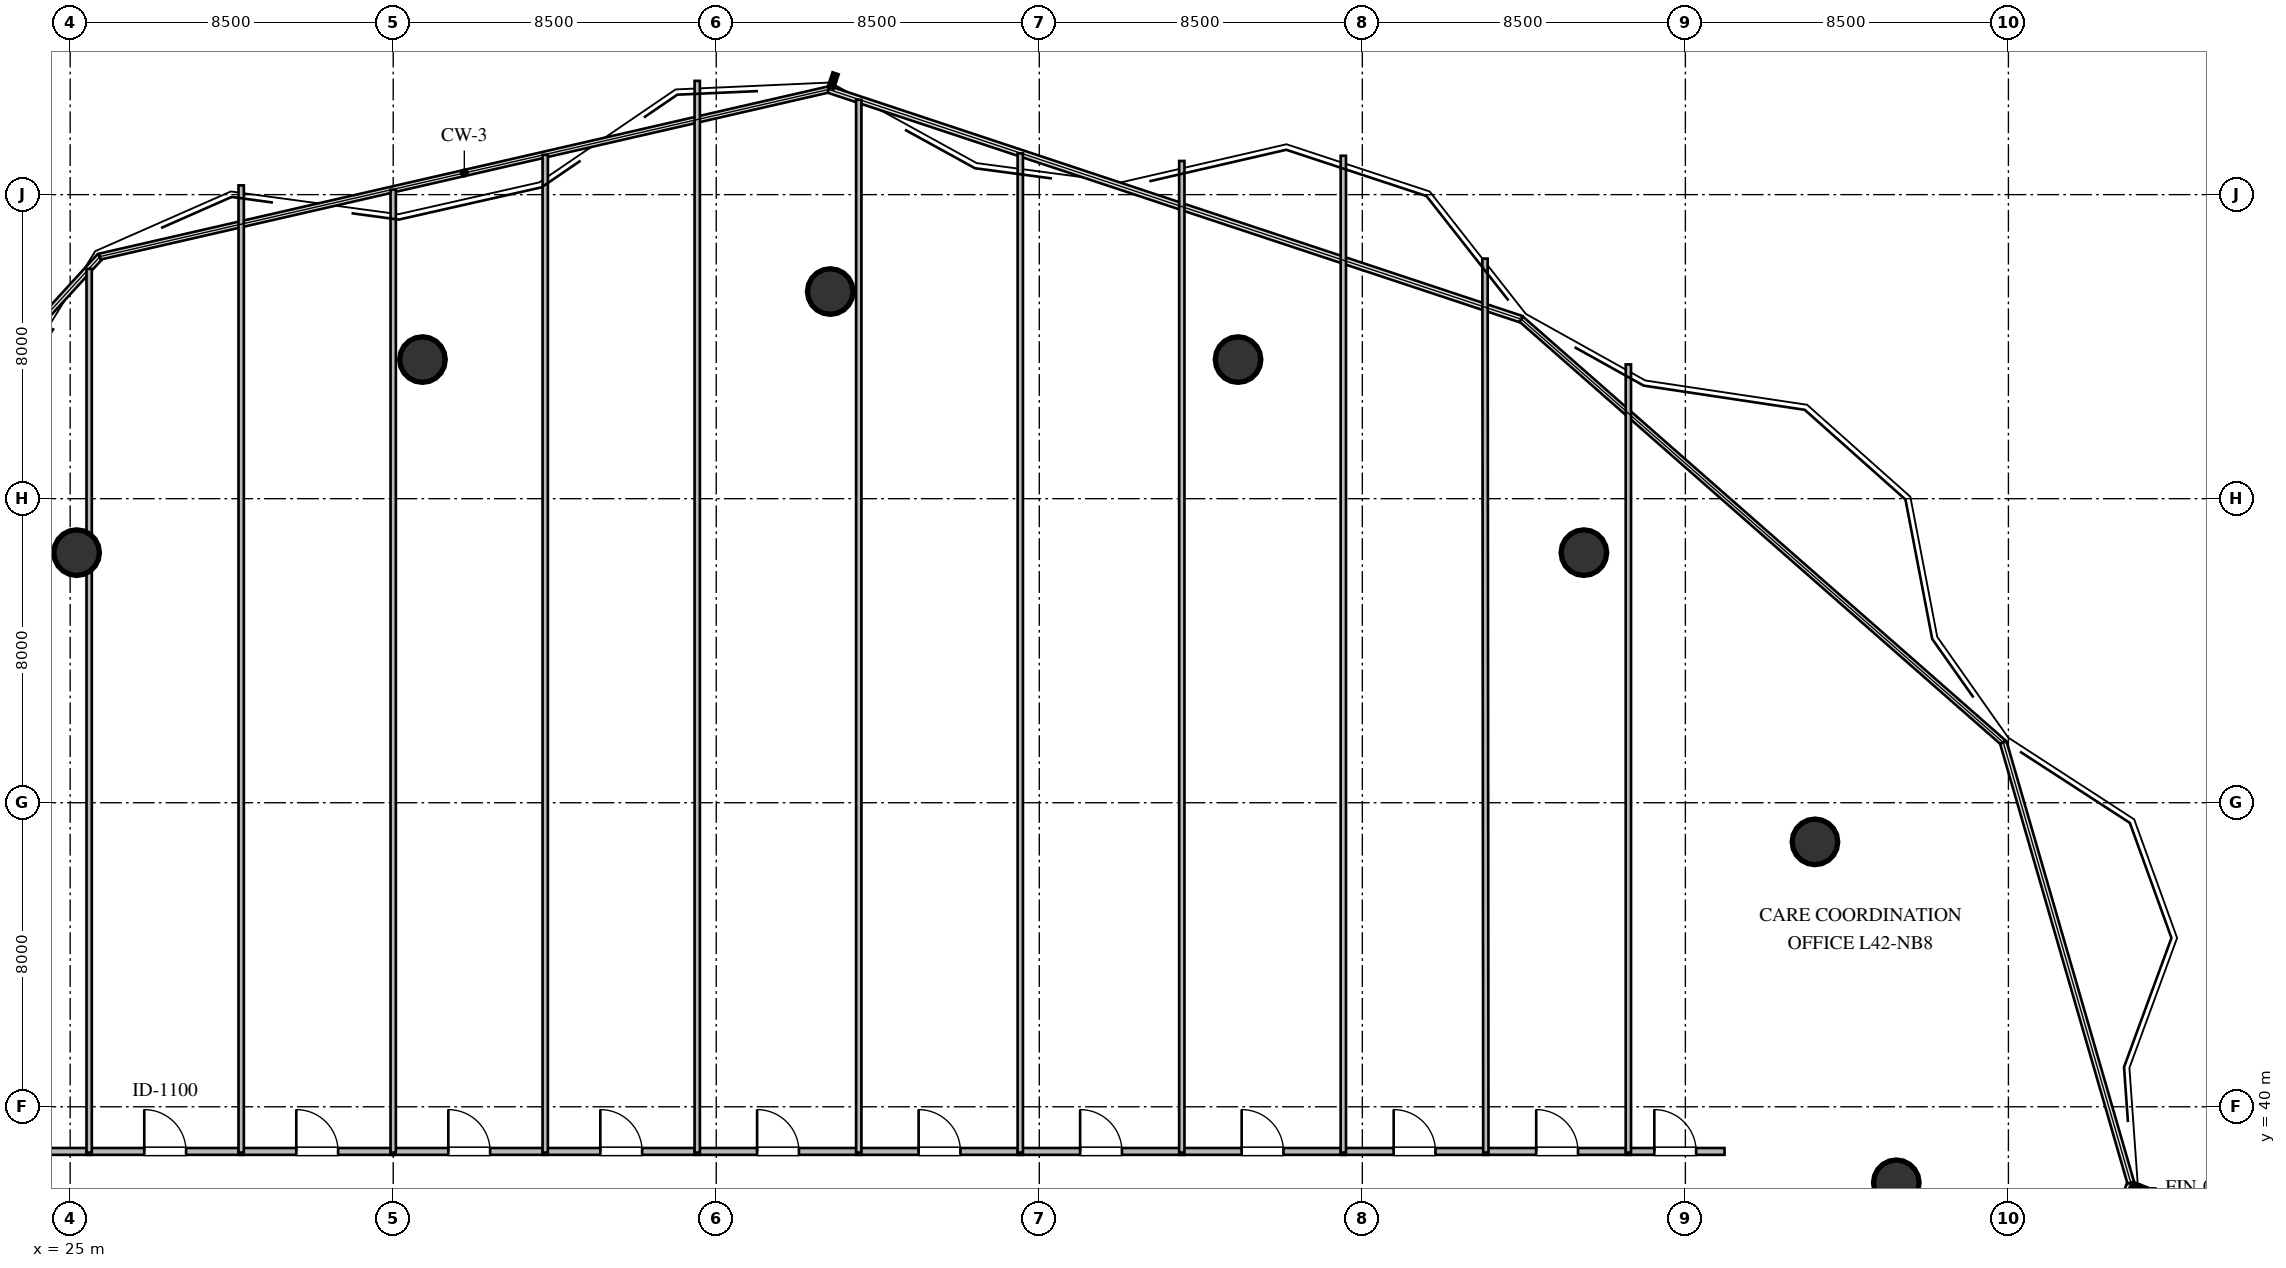
"""IFC4 building model, lengths in metres.
Left out: names, types, materials, properties, quantities, classifications, styles, units other than length and angle.
Written with IfcOpenShell. Run it as: python <this file> out.ifc"""

import sys

from ifc_helpers import new_model, si_unit, direction, frame, frame_2d, origin, origin_2d, place, context, subcontext, project, spatial, rectangle, circle, extrude, element, fill, save


model = new_model("IFC4")
c1 = context("Model", 3, precision=1e-05, world=origin(), true_north=direction((0.0, 1.0)))
c2 = subcontext(c1, "Body", "Model", "MODEL_VIEW")
j1 = project(units=[si_unit("LENGTHUNIT", "METRE"), si_unit("PLANEANGLEUNIT", "RADIAN")], contexts=[c1])
p1 = place(None, origin())
s1 = spatial("IfcSite", under=j1, at=p1, CompositionType="ELEMENT")
p2 = place(p1, origin())
s2 = spatial("IfcBuilding", under=s1, at=p2, CompositionType="ELEMENT")
p3 = place(p2, frame((0.0, 0.0, 160.2)))
s3 = spatial("IfcBuildingStorey", under=s2, at=p3, CompositionType="ELEMENT", Elevation=160.2)
for number, where, z_axis, x_axis in (
    (1, (73.05, 38.0, 0.0), (0.0, 0.0, 1.0), (1.0, 0.0, 0.0)),
    (2, (70.91, 46.97, 0.0), (0.0, 0.0, 1.0), (1.0, 0.0, 0.0)),
    (3, (64.83, 54.58, 0.0), (0.0, 0.0, 1.0), (1.0, 0.0, 0.0)),
    (4, (55.73, 59.66, 0.0), (0.0, 0.0, 1.0), (1.0, 0.0, 0.0)),
    (5, (45.0, 61.45, 0.0), (0.0, 0.0, 1.0), (1.0, 0.0, 0.0)),
    (6, (34.27, 59.66, 0.0), (0.0, 0.0, 1.0), (1.0, 0.0, 0.0)),
    (7, (25.17, 54.58, 0.0), (0.0, 0.0, 1.0), (1.0, 0.0, 0.0)),
):
    element("IfcColumn", number, at=place(p3, frame(where, z_axis=z_axis, x_axis=x_axis)), inside=s3, PredefinedType="COLUMN", context=c2, shape_type="SweptSolid", body=[
        extrude(circle(Radius=0.6, at=origin_2d()), origin(), (0.0, 0.0, 1.0), 3.6),
    ])
p4 = place(p3, frame((21.685, 38.825, 0.0), z_axis=(0.0, 0.0, 1.0), x_axis=(1.0, 0.0, 0.0)))
e8 = element("IfcWall", 8, at=p4, inside=s3, PredefinedType="PARTITIONING", context=c2, shape_type="SweptSolid", body=[
    extrude(rectangle(XDim=3.88, YDim=0.18, at=frame_2d((1.94, 0.0))), origin(), (0.0, 0.0, 1.0), 3.36),
])
p5 = place(p4, frame((1.39, 0.0, 0.0)))
e9 = element("IfcOpeningElement", 9, at=p5, cuts=e8, PredefinedType="OPENING", context=c2, shape_type="SweptSolid", body=[
    extrude(rectangle(XDim=1.1, YDim=2.1, at=frame_2d((0.55, 1.05))), frame((0.0, 0.1, 0.0), z_axis=(0.0, -1.0, 0.0), x_axis=(1.0, 0.0, 0.0)), (0.0, 0.0, 1.0), 0.2),
])
p6 = place(p3, frame((25.435, 38.825, 0.0), z_axis=(0.0, 0.0, 1.0), x_axis=(1.0, 0.0, 0.0)))
e10 = element("IfcWall", 10, at=p6, inside=s3, PredefinedType="PARTITIONING", context=c2, shape_type="SweptSolid", body=[
    extrude(rectangle(XDim=4.13, YDim=0.18, at=frame_2d((2.065, 0.0))), origin(), (0.0, 0.0, 1.0), 3.36),
])
p7 = place(p6, frame((1.515, 0.0, 0.0)))
e11 = element("IfcOpeningElement", 11, at=p7, cuts=e10, PredefinedType="OPENING", context=c2, shape_type="SweptSolid", body=[
    extrude(rectangle(XDim=1.1, YDim=2.1, at=frame_2d((0.55, 1.05))), frame((0.0, 0.1, 0.0), z_axis=(0.0, -1.0, 0.0), x_axis=(1.0, 0.0, 0.0)), (0.0, 0.0, 1.0), 0.2),
])
p8 = place(p3, frame((29.435, 38.825, 0.0), z_axis=(0.0, 0.0, 1.0), x_axis=(1.0, 0.0, 0.0)))
e12 = element("IfcWall", 12, at=p8, inside=s3, PredefinedType="PARTITIONING", context=c2, shape_type="SweptSolid", body=[
    extrude(rectangle(XDim=4.13, YDim=0.18, at=frame_2d((2.065, 0.0))), origin(), (0.0, 0.0, 1.0), 3.36),
])
p9 = place(p8, frame((1.515, 0.0, 0.0)))
e13 = element("IfcOpeningElement", 13, at=p9, cuts=e12, PredefinedType="OPENING", context=c2, shape_type="SweptSolid", body=[
    extrude(rectangle(XDim=1.1, YDim=2.1, at=frame_2d((0.55, 1.05))), frame((0.0, 0.1, 0.0), z_axis=(0.0, -1.0, 0.0), x_axis=(1.0, 0.0, 0.0)), (0.0, 0.0, 1.0), 0.2),
])
p10 = place(p3, frame((33.435, 38.825, 0.0), z_axis=(0.0, 0.0, 1.0), x_axis=(1.0, 0.0, 0.0)))
e14 = element("IfcWall", 14, at=p10, inside=s3, PredefinedType="PARTITIONING", context=c2, shape_type="SweptSolid", body=[
    extrude(rectangle(XDim=4.13, YDim=0.18, at=frame_2d((2.065, 0.0))), origin(), (0.0, 0.0, 1.0), 3.36),
])
p11 = place(p10, frame((1.515, 0.0, 0.0)))
e15 = element("IfcOpeningElement", 15, at=p11, cuts=e14, PredefinedType="OPENING", context=c2, shape_type="SweptSolid", body=[
    extrude(rectangle(XDim=1.1, YDim=2.1, at=frame_2d((0.55, 1.05))), frame((0.0, 0.1, 0.0), z_axis=(0.0, -1.0, 0.0), x_axis=(1.0, 0.0, 0.0)), (0.0, 0.0, 1.0), 0.2),
])
p12 = place(p3, frame((37.435, 38.825, 0.0), z_axis=(0.0, 0.0, 1.0), x_axis=(1.0, 0.0, 0.0)))
e16 = element("IfcWall", 16, at=p12, inside=s3, PredefinedType="PARTITIONING", context=c2, shape_type="SweptSolid", body=[
    extrude(rectangle(XDim=4.13, YDim=0.18, at=frame_2d((2.065, 0.0))), origin(), (0.0, 0.0, 1.0), 3.36),
])
p13 = place(p12, frame((1.515, 0.0, 0.0)))
e17 = element("IfcOpeningElement", 17, at=p13, cuts=e16, PredefinedType="OPENING", context=c2, shape_type="SweptSolid", body=[
    extrude(rectangle(XDim=1.1, YDim=2.1, at=frame_2d((0.55, 1.05))), frame((0.0, 0.1, 0.0), z_axis=(0.0, -1.0, 0.0), x_axis=(1.0, 0.0, 0.0)), (0.0, 0.0, 1.0), 0.2),
])
p14 = place(p3, frame((41.435, 38.825, 0.0), z_axis=(0.0, 0.0, 1.0), x_axis=(1.0, 0.0, 0.0)))
e18 = element("IfcWall", 18, at=p14, inside=s3, PredefinedType="PARTITIONING", context=c2, shape_type="SweptSolid", body=[
    extrude(rectangle(XDim=4.38, YDim=0.18, at=frame_2d((2.19, 0.0))), origin(), (0.0, 0.0, 1.0), 3.36),
])
p15 = place(p14, frame((1.64, 0.0, 0.0)))
e19 = element("IfcOpeningElement", 19, at=p15, cuts=e18, PredefinedType="OPENING", context=c2, shape_type="SweptSolid", body=[
    extrude(rectangle(XDim=1.1, YDim=2.1, at=frame_2d((0.55, 1.05))), frame((0.0, 0.1, 0.0), z_axis=(0.0, -1.0, 0.0), x_axis=(1.0, 0.0, 0.0)), (0.0, 0.0, 1.0), 0.2),
])
p16 = place(p3, frame((45.685, 38.825, 0.0), z_axis=(0.0, 0.0, 1.0), x_axis=(1.0, 0.0, 0.0)))
e20 = element("IfcWall", 20, at=p16, inside=s3, PredefinedType="PARTITIONING", context=c2, shape_type="SweptSolid", body=[
    extrude(rectangle(XDim=4.38, YDim=0.18, at=frame_2d((2.19, 0.0))), origin(), (0.0, 0.0, 1.0), 3.36),
])
p17 = place(p16, frame((1.64, 0.0, 0.0)))
e21 = element("IfcOpeningElement", 21, at=p17, cuts=e20, PredefinedType="OPENING", context=c2, shape_type="SweptSolid", body=[
    extrude(rectangle(XDim=1.1, YDim=2.1, at=frame_2d((0.55, 1.05))), frame((0.0, 0.1, 0.0), z_axis=(0.0, -1.0, 0.0), x_axis=(1.0, 0.0, 0.0)), (0.0, 0.0, 1.0), 0.2),
])
p18 = place(p3, frame((49.935, 38.825, 0.0), z_axis=(0.0, 0.0, 1.0), x_axis=(1.0, 0.0, 0.0)))
e22 = element("IfcWall", 22, at=p18, inside=s3, PredefinedType="PARTITIONING", context=c2, shape_type="SweptSolid", body=[
    extrude(rectangle(XDim=4.38, YDim=0.18, at=frame_2d((2.19, 0.0))), origin(), (0.0, 0.0, 1.0), 3.36),
])
p19 = place(p18, frame((1.64, 0.0, 0.0)))
e23 = element("IfcOpeningElement", 23, at=p19, cuts=e22, PredefinedType="OPENING", context=c2, shape_type="SweptSolid", body=[
    extrude(rectangle(XDim=1.1, YDim=2.1, at=frame_2d((0.55, 1.05))), frame((0.0, 0.1, 0.0), z_axis=(0.0, -1.0, 0.0), x_axis=(1.0, 0.0, 0.0)), (0.0, 0.0, 1.0), 0.2),
])
p20 = place(p3, frame((54.185, 38.825, 0.0), z_axis=(0.0, 0.0, 1.0), x_axis=(1.0, 0.0, 0.0)))
e24 = element("IfcWall", 24, at=p20, inside=s3, PredefinedType="PARTITIONING", context=c2, shape_type="SweptSolid", body=[
    extrude(rectangle(XDim=4.38, YDim=0.18, at=frame_2d((2.19, 0.0))), origin(), (0.0, 0.0, 1.0), 3.36),
])
p21 = place(p20, frame((1.64, 0.0, 0.0)))
e25 = element("IfcOpeningElement", 25, at=p21, cuts=e24, PredefinedType="OPENING", context=c2, shape_type="SweptSolid", body=[
    extrude(rectangle(XDim=1.1, YDim=2.1, at=frame_2d((0.55, 1.05))), frame((0.0, 0.1, 0.0), z_axis=(0.0, -1.0, 0.0), x_axis=(1.0, 0.0, 0.0)), (0.0, 0.0, 1.0), 0.2),
])
p22 = place(p3, frame((58.435, 38.825, 0.0), z_axis=(0.0, 0.0, 1.0), x_axis=(1.0, 0.0, 0.0)))
e26 = element("IfcWall", 26, at=p22, inside=s3, PredefinedType="PARTITIONING", context=c2, shape_type="SweptSolid", body=[
    extrude(rectangle(XDim=3.88, YDim=0.18, at=frame_2d((1.94, 0.0))), origin(), (0.0, 0.0, 1.0), 3.36),
])
p23 = place(p22, frame((1.39, 0.0, 0.0)))
e27 = element("IfcOpeningElement", 27, at=p23, cuts=e26, PredefinedType="OPENING", context=c2, shape_type="SweptSolid", body=[
    extrude(rectangle(XDim=1.1, YDim=2.1, at=frame_2d((0.55, 1.05))), frame((0.0, 0.1, 0.0), z_axis=(0.0, -1.0, 0.0), x_axis=(1.0, 0.0, 0.0)), (0.0, 0.0, 1.0), 0.2),
])
p24 = place(p3, frame((62.185, 38.825, 0.0), z_axis=(0.0, 0.0, 1.0), x_axis=(1.0, 0.0, 0.0)))
e28 = element("IfcWall", 28, at=p24, inside=s3, PredefinedType="PARTITIONING", context=c2, shape_type="SweptSolid", body=[
    extrude(rectangle(XDim=3.88, YDim=0.18, at=frame_2d((1.94, 0.0))), origin(), (0.0, 0.0, 1.0), 3.36),
])
p25 = place(p24, frame((1.39, 0.0, 0.0)))
e29 = element("IfcOpeningElement", 29, at=p25, cuts=e28, PredefinedType="OPENING", context=c2, shape_type="SweptSolid", body=[
    extrude(rectangle(XDim=1.1, YDim=2.1, at=frame_2d((0.55, 1.05))), frame((0.0, 0.1, 0.0), z_axis=(0.0, -1.0, 0.0), x_axis=(1.0, 0.0, 0.0)), (0.0, 0.0, 1.0), 0.2),
])
p26 = place(p3, frame((65.935, 38.825, 0.0), z_axis=(0.0, 0.0, 1.0), x_axis=(1.0, 0.0, 0.0)))
e30 = element("IfcWall", 30, at=p26, inside=s3, PredefinedType="PARTITIONING", context=c2, shape_type="SweptSolid", body=[
    extrude(rectangle(XDim=2.595, YDim=0.18, at=frame_2d((1.297, 0.0))), origin(), (0.0, 0.0, 1.0), 3.36),
])
p27 = place(p26, frame((0.748, 0.0, 0.0)))
e31 = element("IfcOpeningElement", 31, at=p27, cuts=e30, PredefinedType="OPENING", context=c2, shape_type="SweptSolid", body=[
    extrude(rectangle(XDim=1.1, YDim=2.1, at=frame_2d((0.55, 1.05))), frame((0.0, 0.1, 0.0), z_axis=(0.0, -1.0, 0.0), x_axis=(1.0, 0.0, 0.0)), (0.0, 0.0, 1.0), 0.2),
])
p28 = place(p3, frame((25.5, 62.049, 0.0), z_axis=(0.0, 0.0, 1.0), x_axis=(0.0, -1.0, 0.0)))
e32 = element("IfcWall", 32, at=p28, inside=s3, PredefinedType="PARTITIONING", context=c2, shape_type="SweptSolid", body=[
    extrude(rectangle(XDim=23.254, YDim=0.14, at=frame_2d((11.627, 0.0))), origin(), (0.0, 0.0, 1.0), 2.806),
])
p29 = place(p3, frame((29.5, 64.244, 0.0), z_axis=(0.0, 0.0, 1.0), x_axis=(0.0, -1.0, 0.0)))
e33 = element("IfcWall", 33, at=p29, inside=s3, PredefinedType="PARTITIONING", context=c2, shape_type="SweptSolid", body=[
    extrude(rectangle(XDim=25.449, YDim=0.14, at=frame_2d((12.725, 0.0))), origin(), (0.0, 0.0, 1.0), 3.36),
])
p30 = place(p3, frame((33.5, 64.13, 0.0), z_axis=(0.0, 0.0, 1.0), x_axis=(0.0, -1.0, 0.0)))
e34 = element("IfcWall", 34, at=p30, inside=s3, PredefinedType="PARTITIONING", context=c2, shape_type="SweptSolid", body=[
    extrude(rectangle(XDim=25.335, YDim=0.14, at=frame_2d((12.667, 0.0))), origin(), (0.0, 0.0, 1.0), 3.36),
])
p31 = place(p3, frame((37.5, 65.047, 0.0), z_axis=(0.0, 0.0, 1.0), x_axis=(0.0, -1.0, 0.0)))
e35 = element("IfcWall", 35, at=p31, inside=s3, PredefinedType="PARTITIONING", context=c2, shape_type="SweptSolid", body=[
    extrude(rectangle(XDim=26.252, YDim=0.14, at=frame_2d((13.126, 0.0))), origin(), (0.0, 0.0, 1.0), 3.36),
])
p32 = place(p3, frame((41.5, 66.993, 0.0), z_axis=(0.0, 0.0, 1.0), x_axis=(0.0, -1.0, 0.0)))
e36 = element("IfcWall", 36, at=p32, inside=s3, PredefinedType="PARTITIONING", context=c2, shape_type="SweptSolid", body=[
    extrude(rectangle(XDim=28.198, YDim=0.14, at=frame_2d((14.099, 0.0))), origin(), (0.0, 0.0, 1.0), 3.36),
])
p33 = place(p3, frame((45.75, 66.495, 0.0), z_axis=(0.0, 0.0, 1.0), x_axis=(0.0, -1.0, 0.0)))
e37 = element("IfcWall", 37, at=p33, inside=s3, PredefinedType="PARTITIONING", context=c2, shape_type="SweptSolid", body=[
    extrude(rectangle(XDim=27.7, YDim=0.14, at=frame_2d((13.85, 0.0))), origin(), (0.0, 0.0, 1.0), 3.36),
])
p34 = place(p3, frame((50.0, 65.085, 0.0), z_axis=(0.0, 0.0, 1.0), x_axis=(0.0, -1.0, 0.0)))
e38 = element("IfcWall", 38, at=p34, inside=s3, PredefinedType="PARTITIONING", context=c2, shape_type="SweptSolid", body=[
    extrude(rectangle(XDim=26.291, YDim=0.14, at=frame_2d((13.145, 0.0))), origin(), (0.0, 0.0, 1.0), 3.36),
])
p35 = place(p3, frame((54.25, 64.886, 0.0), z_axis=(0.0, 0.0, 1.0), x_axis=(0.0, -1.0, 0.0)))
e39 = element("IfcWall", 39, at=p35, inside=s3, PredefinedType="PARTITIONING", context=c2, shape_type="SweptSolid", body=[
    extrude(rectangle(XDim=26.091, YDim=0.14, at=frame_2d((13.045, 0.0))), origin(), (0.0, 0.0, 1.0), 3.36),
])
p36 = place(p3, frame((58.5, 65.023, 0.0), z_axis=(0.0, 0.0, 1.0), x_axis=(0.0, -1.0, 0.0)))
e40 = element("IfcWall", 40, at=p36, inside=s3, PredefinedType="PARTITIONING", context=c2, shape_type="SweptSolid", body=[
    extrude(rectangle(XDim=26.228, YDim=0.14, at=frame_2d((13.114, 0.0))), origin(), (0.0, 0.0, 1.0), 2.996),
])
p37 = place(p3, frame((62.228, 62.317, 0.0), z_axis=(0.0, 0.0, 1.0), x_axis=(0.000934132821, -0.999999563698, 0.0)))
e41 = element("IfcWall", 41, at=p37, inside=s3, PredefinedType="PARTITIONING", context=c2, shape_type="SweptSolid", body=[
    extrude(rectangle(XDim=23.522, YDim=0.14, at=frame_2d((11.761, 0.0))), origin(), (0.0, 0.0, 1.0), 3.36),
])
p38 = place(p3, frame((66.0, 59.533, 0.0), z_axis=(0.0, 0.0, 1.0), x_axis=(0.0, -1.0, 0.0)))
e42 = element("IfcWall", 42, at=p38, inside=s3, PredefinedType="PARTITIONING", context=c2, shape_type="SweptSolid", body=[
    extrude(rectangle(XDim=20.738, YDim=0.14, at=frame_2d((10.369, 0.0))), origin(), (0.0, 0.0, 1.0), 3.36),
])
p39 = place(p7, origin())
e43 = element("IfcDoor", 43, at=p39, inside=s3, OperationType="SINGLE_SWING_LEFT", PredefinedType="DOOR", context=c2, shape_type="SweptSolid", body=[
    extrude(rectangle(XDim=1.1, YDim=2.1, at=frame_2d((0.55, 1.05))), frame((0.0, 0.025, 0.0), z_axis=(0.0, -1.0, 0.0), x_axis=(1.0, 0.0, 0.0)), (0.0, 0.0, 1.0), 0.05),
])
fill(e11, e43)
p40 = place(p9, origin())
e44 = element("IfcDoor", 44, at=p40, inside=s3, OperationType="SINGLE_SWING_LEFT", PredefinedType="DOOR", context=c2, shape_type="SweptSolid", body=[
    extrude(rectangle(XDim=1.1, YDim=2.1, at=frame_2d((0.55, 1.05))), frame((0.0, 0.025, 0.0), z_axis=(0.0, -1.0, 0.0), x_axis=(1.0, 0.0, 0.0)), (0.0, 0.0, 1.0), 0.05),
])
fill(e13, e44)
p41 = place(p11, origin())
e45 = element("IfcDoor", 45, at=p41, inside=s3, OperationType="SINGLE_SWING_LEFT", PredefinedType="DOOR", context=c2, shape_type="SweptSolid", body=[
    extrude(rectangle(XDim=1.1, YDim=2.1, at=frame_2d((0.55, 1.05))), frame((0.0, 0.025, 0.0), z_axis=(0.0, -1.0, 0.0), x_axis=(1.0, 0.0, 0.0)), (0.0, 0.0, 1.0), 0.05),
])
fill(e15, e45)
p42 = place(p13, origin())
e46 = element("IfcDoor", 46, at=p42, inside=s3, OperationType="SINGLE_SWING_LEFT", PredefinedType="DOOR", context=c2, shape_type="SweptSolid", body=[
    extrude(rectangle(XDim=1.1, YDim=2.1, at=frame_2d((0.55, 1.05))), frame((0.0, 0.025, 0.0), z_axis=(0.0, -1.0, 0.0), x_axis=(1.0, 0.0, 0.0)), (0.0, 0.0, 1.0), 0.05),
])
fill(e17, e46)
p43 = place(p15, origin())
e47 = element("IfcDoor", 47, at=p43, inside=s3, OperationType="SINGLE_SWING_LEFT", PredefinedType="DOOR", context=c2, shape_type="SweptSolid", body=[
    extrude(rectangle(XDim=1.1, YDim=2.1, at=frame_2d((0.55, 1.05))), frame((0.0, 0.025, 0.0), z_axis=(0.0, -1.0, 0.0), x_axis=(1.0, 0.0, 0.0)), (0.0, 0.0, 1.0), 0.05),
])
fill(e19, e47)
p44 = place(p17, origin())
e48 = element("IfcDoor", 48, at=p44, inside=s3, OperationType="SINGLE_SWING_LEFT", PredefinedType="DOOR", context=c2, shape_type="SweptSolid", body=[
    extrude(rectangle(XDim=1.1, YDim=2.1, at=frame_2d((0.55, 1.05))), frame((0.0, 0.025, 0.0), z_axis=(0.0, -1.0, 0.0), x_axis=(1.0, 0.0, 0.0)), (0.0, 0.0, 1.0), 0.05),
])
fill(e21, e48)
p45 = place(p19, origin())
e49 = element("IfcDoor", 49, at=p45, inside=s3, OperationType="SINGLE_SWING_LEFT", PredefinedType="DOOR", context=c2, shape_type="SweptSolid", body=[
    extrude(rectangle(XDim=1.1, YDim=2.1, at=frame_2d((0.55, 1.05))), frame((0.0, 0.025, 0.0), z_axis=(0.0, -1.0, 0.0), x_axis=(1.0, 0.0, 0.0)), (0.0, 0.0, 1.0), 0.05),
])
fill(e23, e49)
p46 = place(p21, origin())
e50 = element("IfcDoor", 50, at=p46, inside=s3, OperationType="SINGLE_SWING_LEFT", PredefinedType="DOOR", context=c2, shape_type="SweptSolid", body=[
    extrude(rectangle(XDim=1.1, YDim=2.1, at=frame_2d((0.55, 1.05))), frame((0.0, 0.025, 0.0), z_axis=(0.0, -1.0, 0.0), x_axis=(1.0, 0.0, 0.0)), (0.0, 0.0, 1.0), 0.05),
])
fill(e25, e50)
p47 = place(p23, origin())
e51 = element("IfcDoor", 51, at=p47, inside=s3, OperationType="SINGLE_SWING_LEFT", PredefinedType="DOOR", context=c2, shape_type="SweptSolid", body=[
    extrude(rectangle(XDim=1.1, YDim=2.1, at=frame_2d((0.55, 1.05))), frame((0.0, 0.025, 0.0), z_axis=(0.0, -1.0, 0.0), x_axis=(1.0, 0.0, 0.0)), (0.0, 0.0, 1.0), 0.05),
])
fill(e27, e51)
p48 = place(p25, origin())
e52 = element("IfcDoor", 52, at=p48, inside=s3, OperationType="SINGLE_SWING_LEFT", PredefinedType="DOOR", context=c2, shape_type="SweptSolid", body=[
    extrude(rectangle(XDim=1.1, YDim=2.1, at=frame_2d((0.55, 1.05))), frame((0.0, 0.025, 0.0), z_axis=(0.0, -1.0, 0.0), x_axis=(1.0, 0.0, 0.0)), (0.0, 0.0, 1.0), 0.05),
])
fill(e29, e52)
p49 = place(p27, origin())
e53 = element("IfcDoor", 53, at=p49, inside=s3, OperationType="SINGLE_SWING_LEFT", PredefinedType="DOOR", context=c2, shape_type="SweptSolid", body=[
    extrude(rectangle(XDim=1.1, YDim=2.1, at=frame_2d((0.55, 1.05))), frame((0.0, 0.025, 0.0), z_axis=(0.0, -1.0, 0.0), x_axis=(1.0, 0.0, 0.0)), (0.0, 0.0, 1.0), 0.05),
])
fill(e31, e53)
save(model, sys.argv[1])
